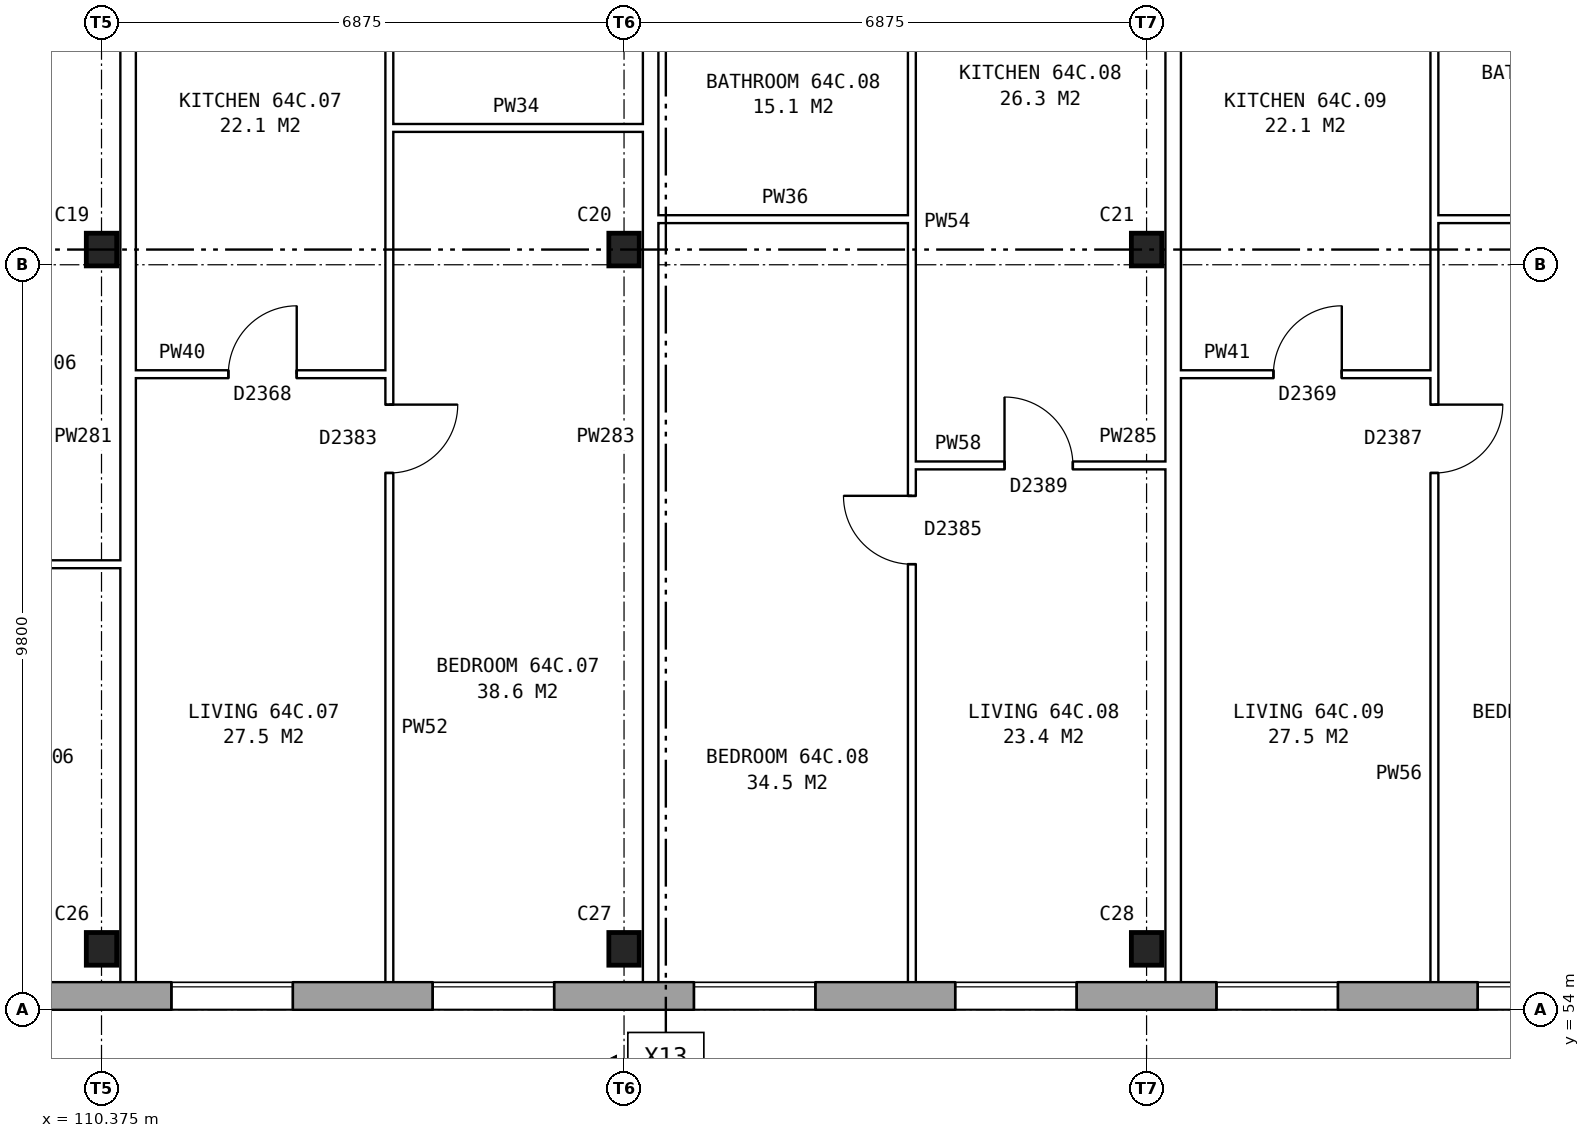
"""IFC4 building model, lengths in metres.
Left out: names, types, materials, properties, quantities, classifications, styles, units other than length and angle.
Written with IfcOpenShell. Run it as: python <this file> out.ifc"""

import sys

from ifc_helpers import new_model, si_unit, direction, frame, frame_2d, origin, origin_2d, place, context, subcontext, project, spatial, rectangle, i_section, extrude, element, fill, save


model = new_model("IFC4")
c1 = context("Model", 3, precision=1e-05, world=origin(), true_north=direction((0.0, 1.0)))
c2 = subcontext(c1, "Body", "Model", "MODEL_VIEW")
j1 = project(units=[si_unit("LENGTHUNIT", "METRE"), si_unit("PLANEANGLEUNIT", "RADIAN")], contexts=[c1])
p1 = place(None, origin())
s1 = spatial("IfcSite", under=j1, at=p1, CompositionType="ELEMENT")
p2 = place(p1, origin())
s2 = spatial("IfcBuilding", under=s1, at=p2, CompositionType="ELEMENT")
p3 = place(p2, frame((0.0, 0.0, 227.6)))
s3 = spatial("IfcBuildingStorey", under=s2, at=p3, CompositionType="ELEMENT", Elevation=227.6)
for number, where, z_axis, x_axis in (
    (1, (110.375, 54.8, 0.0), (0.0, 0.0, 1.0), (1.0, 0.0, 0.0)),
    (2, (117.25, 54.8, 0.0), (0.0, 0.0, 1.0), (1.0, 0.0, 0.0)),
    (3, (124.125, 54.8, 0.0), (0.0, 0.0, 1.0), (1.0, 0.0, 0.0)),
    (4, (110.375, 64.0, 0.0), (0.0, 0.0, 1.0), (1.0, 0.0, 0.0)),
    (5, (117.25, 64.0, 0.0), (0.0, 0.0, 1.0), (1.0, 0.0, 0.0)),
    (6, (124.125, 64.0, 0.0), (0.0, 0.0, 1.0), (1.0, 0.0, 0.0)),
):
    element("IfcColumn", number, at=place(p3, frame(where, z_axis=z_axis, x_axis=x_axis)), inside=s3, PredefinedType="COLUMN", context=c2, shape_type="SweptSolid", body=[
        extrude(i_section(OverallWidth=0.4, OverallDepth=0.43, WebThickness=0.04, FlangeThickness=0.04, at=origin_2d()), origin(), (0.0, 0.0, 1.0), 2.85),
    ])
p4 = place(p3, frame((75.95, 54.18, 0.0), z_axis=(0.0, 0.0, 1.0), x_axis=(1.0, 0.0, 0.0)))
e7 = element("IfcWall", 7, at=p4, inside=s3, PredefinedType="STANDARD", context=c2, shape_type="SweptSolid", body=[
    extrude(rectangle(XDim=55.1, YDim=0.36, at=frame_2d((27.55, 0.0))), origin(), (0.0, 0.0, 1.0), 2.85),
])
p5 = place(p4, frame((0.969, 0.0, 0.8)))
e8 = element("IfcOpeningElement", 8, at=p5, cuts=e7, PredefinedType="OPENING", context=c2, shape_type="SweptSolid", body=[
    extrude(rectangle(XDim=1.6, YDim=1.8, at=frame_2d((0.8, 0.9))), frame((0.0, 0.19, 0.0), z_axis=(0.0, -1.0, 0.0), x_axis=(1.0, 0.0, 0.0)), (0.0, 0.0, 1.0), 0.38),
])
p6 = place(p4, frame((4.406, 0.0, 0.8)))
e9 = element("IfcOpeningElement", 9, at=p6, cuts=e7, PredefinedType="OPENING", context=c2, shape_type="SweptSolid", body=[
    extrude(rectangle(XDim=1.6, YDim=1.8, at=frame_2d((0.8, 0.9))), frame((0.0, 0.19, 0.0), z_axis=(0.0, -1.0, 0.0), x_axis=(1.0, 0.0, 0.0)), (0.0, 0.0, 1.0), 0.38),
])
p7 = place(p4, frame((7.844, 0.0, 0.8)))
e10 = element("IfcOpeningElement", 10, at=p7, cuts=e7, PredefinedType="OPENING", context=c2, shape_type="SweptSolid", body=[
    extrude(rectangle(XDim=1.6, YDim=1.8, at=frame_2d((0.8, 0.9))), frame((0.0, 0.19, 0.0), z_axis=(0.0, -1.0, 0.0), x_axis=(1.0, 0.0, 0.0)), (0.0, 0.0, 1.0), 0.38),
])
p8 = place(p4, frame((11.281, 0.0, 0.8)))
e11 = element("IfcOpeningElement", 11, at=p8, cuts=e7, PredefinedType="OPENING", context=c2, shape_type="SweptSolid", body=[
    extrude(rectangle(XDim=1.6, YDim=1.8, at=frame_2d((0.8, 0.9))), frame((0.0, 0.19, 0.0), z_axis=(0.0, -1.0, 0.0), x_axis=(1.0, 0.0, 0.0)), (0.0, 0.0, 1.0), 0.38),
])
p9 = place(p4, frame((14.719, 0.0, 0.8)))
e12 = element("IfcOpeningElement", 12, at=p9, cuts=e7, PredefinedType="OPENING", context=c2, shape_type="SweptSolid", body=[
    extrude(rectangle(XDim=1.6, YDim=1.8, at=frame_2d((0.8, 0.9))), frame((0.0, 0.19, 0.0), z_axis=(0.0, -1.0, 0.0), x_axis=(1.0, 0.0, 0.0)), (0.0, 0.0, 1.0), 0.38),
])
p10 = place(p4, frame((18.156, 0.0, 0.8)))
e13 = element("IfcOpeningElement", 13, at=p10, cuts=e7, PredefinedType="OPENING", context=c2, shape_type="SweptSolid", body=[
    extrude(rectangle(XDim=1.6, YDim=1.8, at=frame_2d((0.8, 0.9))), frame((0.0, 0.19, 0.0), z_axis=(0.0, -1.0, 0.0), x_axis=(1.0, 0.0, 0.0)), (0.0, 0.0, 1.0), 0.38),
])
p11 = place(p4, frame((21.594, 0.0, 0.8)))
e14 = element("IfcOpeningElement", 14, at=p11, cuts=e7, PredefinedType="OPENING", context=c2, shape_type="SweptSolid", body=[
    extrude(rectangle(XDim=1.6, YDim=1.8, at=frame_2d((0.8, 0.9))), frame((0.0, 0.19, 0.0), z_axis=(0.0, -1.0, 0.0), x_axis=(1.0, 0.0, 0.0)), (0.0, 0.0, 1.0), 0.38),
])
p12 = place(p4, frame((25.031, 0.0, 0.8)))
e15 = element("IfcOpeningElement", 15, at=p12, cuts=e7, PredefinedType="OPENING", context=c2, shape_type="SweptSolid", body=[
    extrude(rectangle(XDim=1.6, YDim=1.8, at=frame_2d((0.8, 0.9))), frame((0.0, 0.19, 0.0), z_axis=(0.0, -1.0, 0.0), x_axis=(1.0, 0.0, 0.0)), (0.0, 0.0, 1.0), 0.38),
])
p13 = place(p4, frame((28.469, 0.0, 0.8)))
e16 = element("IfcOpeningElement", 16, at=p13, cuts=e7, PredefinedType="OPENING", context=c2, shape_type="SweptSolid", body=[
    extrude(rectangle(XDim=1.6, YDim=1.8, at=frame_2d((0.8, 0.9))), frame((0.0, 0.19, 0.0), z_axis=(0.0, -1.0, 0.0), x_axis=(1.0, 0.0, 0.0)), (0.0, 0.0, 1.0), 0.38),
])
p14 = place(p4, frame((31.906, 0.0, 0.8)))
e17 = element("IfcOpeningElement", 17, at=p14, cuts=e7, PredefinedType="OPENING", context=c2, shape_type="SweptSolid", body=[
    extrude(rectangle(XDim=1.6, YDim=1.8, at=frame_2d((0.8, 0.9))), frame((0.0, 0.19, 0.0), z_axis=(0.0, -1.0, 0.0), x_axis=(1.0, 0.0, 0.0)), (0.0, 0.0, 1.0), 0.38),
])
p15 = place(p4, frame((35.344, 0.0, 0.8)))
e18 = element("IfcOpeningElement", 18, at=p15, cuts=e7, PredefinedType="OPENING", context=c2, shape_type="SweptSolid", body=[
    extrude(rectangle(XDim=1.6, YDim=1.8, at=frame_2d((0.8, 0.9))), frame((0.0, 0.19, 0.0), z_axis=(0.0, -1.0, 0.0), x_axis=(1.0, 0.0, 0.0)), (0.0, 0.0, 1.0), 0.38),
])
p16 = place(p4, frame((38.781, 0.0, 0.8)))
e19 = element("IfcOpeningElement", 19, at=p16, cuts=e7, PredefinedType="OPENING", context=c2, shape_type="SweptSolid", body=[
    extrude(rectangle(XDim=1.6, YDim=1.8, at=frame_2d((0.8, 0.9))), frame((0.0, 0.19, 0.0), z_axis=(0.0, -1.0, 0.0), x_axis=(1.0, 0.0, 0.0)), (0.0, 0.0, 1.0), 0.38),
])
p17 = place(p4, frame((42.219, 0.0, 0.8)))
e20 = element("IfcOpeningElement", 20, at=p17, cuts=e7, PredefinedType="OPENING", context=c2, shape_type="SweptSolid", body=[
    extrude(rectangle(XDim=1.6, YDim=1.8, at=frame_2d((0.8, 0.9))), frame((0.0, 0.19, 0.0), z_axis=(0.0, -1.0, 0.0), x_axis=(1.0, 0.0, 0.0)), (0.0, 0.0, 1.0), 0.38),
])
p18 = place(p4, frame((45.656, 0.0, 0.8)))
e21 = element("IfcOpeningElement", 21, at=p18, cuts=e7, PredefinedType="OPENING", context=c2, shape_type="SweptSolid", body=[
    extrude(rectangle(XDim=1.6, YDim=1.8, at=frame_2d((0.8, 0.9))), frame((0.0, 0.19, 0.0), z_axis=(0.0, -1.0, 0.0), x_axis=(1.0, 0.0, 0.0)), (0.0, 0.0, 1.0), 0.38),
])
p19 = place(p4, frame((49.094, 0.0, 0.8)))
e22 = element("IfcOpeningElement", 22, at=p19, cuts=e7, PredefinedType="OPENING", context=c2, shape_type="SweptSolid", body=[
    extrude(rectangle(XDim=1.6, YDim=1.8, at=frame_2d((0.8, 0.9))), frame((0.0, 0.19, 0.0), z_axis=(0.0, -1.0, 0.0), x_axis=(1.0, 0.0, 0.0)), (0.0, 0.0, 1.0), 0.38),
])
p20 = place(p4, frame((52.531, 0.0, 0.8)))
e23 = element("IfcOpeningElement", 23, at=p20, cuts=e7, PredefinedType="OPENING", context=c2, shape_type="SweptSolid", body=[
    extrude(rectangle(XDim=1.6, YDim=1.8, at=frame_2d((0.8, 0.9))), frame((0.0, 0.19, 0.0), z_axis=(0.0, -1.0, 0.0), x_axis=(1.0, 0.0, 0.0)), (0.0, 0.0, 1.0), 0.38),
])
p21 = place(p3, frame((107.287, 59.86, 0.0), z_axis=(0.0, 0.0, 1.0), x_axis=(1.0, 0.0, 0.0)))
e24 = element("IfcWall", 24, at=p21, inside=s3, PredefinedType="PARTITIONING", context=c2, shape_type="SweptSolid", body=[
    extrude(rectangle(XDim=3.338, YDim=0.1, at=frame_2d((1.669, 0.0))), origin(), (0.0, 0.0, 1.0), 2.85),
])
p22 = place(p21, frame((1.219, 0.0, 0.0)))
e25 = element("IfcOpeningElement", 25, at=p22, cuts=e24, PredefinedType="OPENING", context=c2, shape_type="SweptSolid", body=[
    extrude(rectangle(XDim=0.9, YDim=2.1, at=frame_2d((0.45, 1.05))), frame((0.0, 0.06, 0.0), z_axis=(0.0, -1.0, 0.0), x_axis=(1.0, 0.0, 0.0)), (0.0, 0.0, 1.0), 0.12),
])
p23 = place(p3, frame((121.037, 61.16, 0.0), z_axis=(0.0, 0.0, 1.0), x_axis=(1.0, 0.0, 0.0)))
e26 = element("IfcWall", 26, at=p23, inside=s3, PredefinedType="PARTITIONING", context=c2, shape_type="SweptSolid", body=[
    extrude(rectangle(XDim=3.338, YDim=0.1, at=frame_2d((1.669, 0.0))), origin(), (0.0, 0.0, 1.0), 2.85),
])
p24 = place(p23, frame((1.219, 0.0, 0.0)))
e27 = element("IfcOpeningElement", 27, at=p24, cuts=e26, PredefinedType="OPENING", context=c2, shape_type="SweptSolid", body=[
    extrude(rectangle(XDim=0.9, YDim=2.1, at=frame_2d((0.45, 1.05))), frame((0.0, 0.06, 0.0), z_axis=(0.0, -1.0, 0.0), x_axis=(1.0, 0.0, 0.0)), (0.0, 0.0, 1.0), 0.12),
])
p25 = place(p3, frame((110.825, 62.36, 0.0), z_axis=(0.0, 0.0, 1.0), x_axis=(1.0, 0.0, 0.0)))
e28 = element("IfcWall", 28, at=p25, inside=s3, PredefinedType="PARTITIONING", context=c2, shape_type="SweptSolid", body=[
    extrude(rectangle(XDim=3.337, YDim=0.1, at=frame_2d((1.668, 0.0))), origin(), (0.0, 0.0, 1.0), 2.85),
])
p26 = place(p25, frame((1.219, 0.0, 0.0)))
e29 = element("IfcOpeningElement", 29, at=p26, cuts=e28, PredefinedType="OPENING", context=c2, shape_type="SweptSolid", body=[
    extrude(rectangle(XDim=0.9, YDim=2.1, at=frame_2d((0.45, 1.05))), frame((0.0, 0.06, 0.0), z_axis=(0.0, -1.0, 0.0), x_axis=(1.0, 0.0, 0.0)), (0.0, 0.0, 1.0), 0.12),
])
p27 = place(p3, frame((124.575, 62.36, 0.0), z_axis=(0.0, 0.0, 1.0), x_axis=(1.0, 0.0, 0.0)))
e30 = element("IfcWall", 30, at=p27, inside=s3, PredefinedType="PARTITIONING", context=c2, shape_type="SweptSolid", body=[
    extrude(rectangle(XDim=3.337, YDim=0.1, at=frame_2d((1.668, 0.0))), origin(), (0.0, 0.0, 1.0), 2.85),
])
p28 = place(p27, frame((1.219, 0.0, 0.0)))
e31 = element("IfcOpeningElement", 31, at=p28, cuts=e30, PredefinedType="OPENING", context=c2, shape_type="SweptSolid", body=[
    extrude(rectangle(XDim=0.9, YDim=2.1, at=frame_2d((0.45, 1.05))), frame((0.0, 0.06, 0.0), z_axis=(0.0, -1.0, 0.0), x_axis=(1.0, 0.0, 0.0)), (0.0, 0.0, 1.0), 0.12),
])
p29 = place(p3, frame((117.7, 64.4, 0.0), z_axis=(0.0, 0.0, 1.0), x_axis=(1.0, 0.0, 0.0)))
e32 = element("IfcWall", 32, at=p29, inside=s3, PredefinedType="PARTITIONING", context=c2, shape_type="SweptSolid", body=[
    extrude(rectangle(XDim=3.337, YDim=0.1, at=frame_2d((1.668, 0.0))), origin(), (0.0, 0.0, 1.0), 2.85),
])
p30 = place(p3, frame((127.912, 64.4, 0.0), z_axis=(0.0, 0.0, 1.0), x_axis=(1.0, 0.0, 0.0)))
e33 = element("IfcWall", 33, at=p30, inside=s3, PredefinedType="PARTITIONING", context=c2, shape_type="SweptSolid", body=[
    extrude(rectangle(XDim=3.448, YDim=0.1, at=frame_2d((1.724, 0.0))), origin(), (0.0, 0.0, 1.0), 2.85),
])
p31 = place(p3, frame((114.162, 65.6, 0.0), z_axis=(0.0, 0.0, 1.0), x_axis=(1.0, 0.0, 0.0)))
e34 = element("IfcWall", 34, at=p31, inside=s3, PredefinedType="PARTITIONING", context=c2, shape_type="SweptSolid", body=[
    extrude(rectangle(XDim=3.338, YDim=0.1, at=frame_2d((1.669, 0.0))), origin(), (0.0, 0.0, 1.0), 2.85),
])
p32 = place(p3, frame((110.725, 54.36, 0.0), z_axis=(0.0, 0.0, 1.0), x_axis=(0.0, 1.0, 0.0)))
e35 = element("IfcWall", 35, at=p32, inside=s3, PredefinedType="PARTITIONING", context=c2, shape_type="SweptSolid", body=[
    extrude(rectangle(XDim=14.34, YDim=0.2, at=frame_2d((7.17, 0.0))), origin(), (0.0, 0.0, 1.0), 2.85),
])
p33 = place(p3, frame((114.162, 54.36, 0.0), z_axis=(0.0, 0.0, 1.0), x_axis=(0.0, 1.0, 0.0)))
e36 = element("IfcWall", 36, at=p33, inside=s3, PredefinedType="PARTITIONING", context=c2, shape_type="SweptSolid", body=[
    extrude(rectangle(XDim=14.34, YDim=0.1, at=frame_2d((7.17, 0.0))), origin(), (0.0, 0.0, 1.0), 2.85),
])
p34 = place(p33, frame((6.7, 0.0, 0.0)))
e37 = element("IfcOpeningElement", 37, at=p34, cuts=e36, PredefinedType="OPENING", context=c2, shape_type="SweptSolid", body=[
    extrude(rectangle(XDim=0.9, YDim=2.1, at=frame_2d((0.45, 1.05))), frame((0.0, 0.06, 0.0), z_axis=(0.0, -1.0, 0.0), x_axis=(1.0, 0.0, 0.0)), (0.0, 0.0, 1.0), 0.12),
])
p35 = place(p33, frame((13.04, 0.0, 0.0)))
e38 = element("IfcOpeningElement", 38, at=p35, cuts=e36, PredefinedType="OPENING", context=c2, shape_type="SweptSolid", body=[
    extrude(rectangle(XDim=0.9, YDim=2.1, at=frame_2d((0.45, 1.05))), frame((0.0, 0.06, 0.0), z_axis=(0.0, -1.0, 0.0), x_axis=(1.0, 0.0, 0.0)), (0.0, 0.0, 1.0), 0.12),
])
p36 = place(p3, frame((117.6, 54.36, 0.0), z_axis=(0.0, 0.0, 1.0), x_axis=(0.0, 1.0, 0.0)))
e39 = element("IfcWall", 39, at=p36, inside=s3, PredefinedType="PARTITIONING", context=c2, shape_type="SweptSolid", body=[
    extrude(rectangle(XDim=14.34, YDim=0.2, at=frame_2d((7.17, 0.0))), origin(), (0.0, 0.0, 1.0), 2.85),
])
p37 = place(p3, frame((121.037, 54.36, 0.0), z_axis=(0.0, 0.0, 1.0), x_axis=(0.0, 1.0, 0.0)))
e40 = element("IfcWall", 40, at=p37, inside=s3, PredefinedType="PARTITIONING", context=c2, shape_type="SweptSolid", body=[
    extrude(rectangle(XDim=14.34, YDim=0.1, at=frame_2d((7.17, 0.0))), origin(), (0.0, 0.0, 1.0), 2.85),
])
p38 = place(p37, frame((5.5, 0.0, 0.0)))
e41 = element("IfcOpeningElement", 41, at=p38, cuts=e40, PredefinedType="OPENING", context=c2, shape_type="SweptSolid", body=[
    extrude(rectangle(XDim=0.9, YDim=2.1, at=frame_2d((0.45, 1.05))), frame((0.0, 0.06, 0.0), z_axis=(0.0, -1.0, 0.0), x_axis=(1.0, 0.0, 0.0)), (0.0, 0.0, 1.0), 0.12),
])
p39 = place(p37, frame((13.04, 0.0, 0.0)))
e42 = element("IfcOpeningElement", 42, at=p39, cuts=e40, PredefinedType="OPENING", context=c2, shape_type="SweptSolid", body=[
    extrude(rectangle(XDim=0.9, YDim=2.1, at=frame_2d((0.45, 1.05))), frame((0.0, 0.06, 0.0), z_axis=(0.0, -1.0, 0.0), x_axis=(1.0, 0.0, 0.0)), (0.0, 0.0, 1.0), 0.12),
])
p40 = place(p3, frame((124.475, 54.36, 0.0), z_axis=(0.0, 0.0, 1.0), x_axis=(0.0, 1.0, 0.0)))
e43 = element("IfcWall", 43, at=p40, inside=s3, PredefinedType="PARTITIONING", context=c2, shape_type="SweptSolid", body=[
    extrude(rectangle(XDim=14.34, YDim=0.2, at=frame_2d((7.17, 0.0))), origin(), (0.0, 0.0, 1.0), 2.85),
])
p41 = place(p3, frame((127.912, 54.36, 0.0), z_axis=(0.0, 0.0, 1.0), x_axis=(0.0, 1.0, 0.0)))
e44 = element("IfcWall", 44, at=p41, inside=s3, PredefinedType="PARTITIONING", context=c2, shape_type="SweptSolid", body=[
    extrude(rectangle(XDim=14.34, YDim=0.1, at=frame_2d((7.17, 0.0))), origin(), (0.0, 0.0, 1.0), 2.85),
])
p42 = place(p41, frame((6.7, 0.0, 0.0)))
e45 = element("IfcOpeningElement", 45, at=p42, cuts=e44, PredefinedType="OPENING", context=c2, shape_type="SweptSolid", body=[
    extrude(rectangle(XDim=0.9, YDim=2.1, at=frame_2d((0.45, 1.05))), frame((0.0, 0.06, 0.0), z_axis=(0.0, -1.0, 0.0), x_axis=(1.0, 0.0, 0.0)), (0.0, 0.0, 1.0), 0.12),
])
p43 = place(p41, frame((13.04, 0.0, 0.0)))
e46 = element("IfcOpeningElement", 46, at=p43, cuts=e44, PredefinedType="OPENING", context=c2, shape_type="SweptSolid", body=[
    extrude(rectangle(XDim=0.9, YDim=2.1, at=frame_2d((0.45, 1.05))), frame((0.0, 0.06, 0.0), z_axis=(0.0, -1.0, 0.0), x_axis=(1.0, 0.0, 0.0)), (0.0, 0.0, 1.0), 0.12),
])
p44 = place(p15, origin())
e47 = element("IfcWindow", 47, at=p44, inside=s3, PartitioningType="SINGLE_PANEL", PredefinedType="WINDOW", context=c2, shape_type="SweptSolid", body=[
    extrude(rectangle(XDim=1.6, YDim=1.8, at=frame_2d((0.8, 0.9))), frame((0.0, 0.15, 0.0), z_axis=(0.0, -1.0, 0.0), x_axis=(1.0, 0.0, 0.0)), (0.0, 0.0, 1.0), 0.06),
])
fill(e18, e47)
p45 = place(p16, origin())
e48 = element("IfcWindow", 48, at=p45, inside=s3, PartitioningType="SINGLE_PANEL", PredefinedType="WINDOW", context=c2, shape_type="SweptSolid", body=[
    extrude(rectangle(XDim=1.6, YDim=1.8, at=frame_2d((0.8, 0.9))), frame((0.0, 0.15, 0.0), z_axis=(0.0, -1.0, 0.0), x_axis=(1.0, 0.0, 0.0)), (0.0, 0.0, 1.0), 0.06),
])
fill(e19, e48)
p46 = place(p17, origin())
e49 = element("IfcWindow", 49, at=p46, inside=s3, PartitioningType="SINGLE_PANEL", PredefinedType="WINDOW", context=c2, shape_type="SweptSolid", body=[
    extrude(rectangle(XDim=1.6, YDim=1.8, at=frame_2d((0.8, 0.9))), frame((0.0, 0.15, 0.0), z_axis=(0.0, -1.0, 0.0), x_axis=(1.0, 0.0, 0.0)), (0.0, 0.0, 1.0), 0.06),
])
fill(e20, e49)
p47 = place(p18, origin())
e50 = element("IfcWindow", 50, at=p47, inside=s3, PartitioningType="SINGLE_PANEL", PredefinedType="WINDOW", context=c2, shape_type="SweptSolid", body=[
    extrude(rectangle(XDim=1.6, YDim=1.8, at=frame_2d((0.8, 0.9))), frame((0.0, 0.15, 0.0), z_axis=(0.0, -1.0, 0.0), x_axis=(1.0, 0.0, 0.0)), (0.0, 0.0, 1.0), 0.06),
])
fill(e21, e50)
p48 = place(p19, origin())
e51 = element("IfcWindow", 51, at=p48, inside=s3, PartitioningType="SINGLE_PANEL", PredefinedType="WINDOW", context=c2, shape_type="SweptSolid", body=[
    extrude(rectangle(XDim=1.6, YDim=1.8, at=frame_2d((0.8, 0.9))), frame((0.0, 0.15, 0.0), z_axis=(0.0, -1.0, 0.0), x_axis=(1.0, 0.0, 0.0)), (0.0, 0.0, 1.0), 0.06),
])
fill(e22, e51)
p49 = place(p20, origin())
e52 = element("IfcWindow", 52, at=p49, inside=s3, PartitioningType="SINGLE_PANEL", PredefinedType="WINDOW", context=c2, shape_type="SweptSolid", body=[
    extrude(rectangle(XDim=1.6, YDim=1.8, at=frame_2d((0.8, 0.9))), frame((0.0, 0.15, 0.0), z_axis=(0.0, -1.0, 0.0), x_axis=(1.0, 0.0, 0.0)), (0.0, 0.0, 1.0), 0.06),
])
fill(e23, e52)
p50 = place(p34, frame((0.9, 0.0, 0.0), z_axis=(0.0, 0.0, 1.0), x_axis=(-1.0, 0.0, 0.0)))
e53 = element("IfcDoor", 53, at=p50, inside=s3, OperationType="SINGLE_SWING_LEFT", PredefinedType="DOOR", context=c2, shape_type="SweptSolid", body=[
    extrude(rectangle(XDim=0.9, YDim=2.1, at=frame_2d((0.45, 1.05))), frame((0.0, 0.025, 0.0), z_axis=(0.0, -1.0, 0.0), x_axis=(1.0, 0.0, 0.0)), (0.0, 0.0, 1.0), 0.05),
])
fill(e37, e53)
p51 = place(p26, origin())
e54 = element("IfcDoor", 54, at=p51, inside=s3, OperationType="SINGLE_SWING_RIGHT", PredefinedType="DOOR", context=c2, shape_type="SweptSolid", body=[
    extrude(rectangle(XDim=0.9, YDim=2.1, at=frame_2d((0.45, 1.05))), frame((0.0, 0.025, 0.0), z_axis=(0.0, -1.0, 0.0), x_axis=(1.0, 0.0, 0.0)), (0.0, 0.0, 1.0), 0.05),
])
fill(e29, e54)
p52 = place(p38, origin())
e55 = element("IfcDoor", 55, at=p52, inside=s3, OperationType="SINGLE_SWING_RIGHT", PredefinedType="DOOR", context=c2, shape_type="SweptSolid", body=[
    extrude(rectangle(XDim=0.9, YDim=2.1, at=frame_2d((0.45, 1.05))), frame((0.0, 0.025, 0.0), z_axis=(0.0, -1.0, 0.0), x_axis=(1.0, 0.0, 0.0)), (0.0, 0.0, 1.0), 0.05),
])
fill(e41, e55)
p53 = place(p24, origin())
e56 = element("IfcDoor", 56, at=p53, inside=s3, OperationType="SINGLE_SWING_LEFT", PredefinedType="DOOR", context=c2, shape_type="SweptSolid", body=[
    extrude(rectangle(XDim=0.9, YDim=2.1, at=frame_2d((0.45, 1.05))), frame((0.0, 0.025, 0.0), z_axis=(0.0, -1.0, 0.0), x_axis=(1.0, 0.0, 0.0)), (0.0, 0.0, 1.0), 0.05),
])
fill(e27, e56)
p54 = place(p42, frame((0.9, 0.0, 0.0), z_axis=(0.0, 0.0, 1.0), x_axis=(-1.0, 0.0, 0.0)))
e57 = element("IfcDoor", 57, at=p54, inside=s3, OperationType="SINGLE_SWING_LEFT", PredefinedType="DOOR", context=c2, shape_type="SweptSolid", body=[
    extrude(rectangle(XDim=0.9, YDim=2.1, at=frame_2d((0.45, 1.05))), frame((0.0, 0.025, 0.0), z_axis=(0.0, -1.0, 0.0), x_axis=(1.0, 0.0, 0.0)), (0.0, 0.0, 1.0), 0.05),
])
fill(e45, e57)
p55 = place(p28, origin())
e58 = element("IfcDoor", 58, at=p55, inside=s3, OperationType="SINGLE_SWING_RIGHT", PredefinedType="DOOR", context=c2, shape_type="SweptSolid", body=[
    extrude(rectangle(XDim=0.9, YDim=2.1, at=frame_2d((0.45, 1.05))), frame((0.0, 0.025, 0.0), z_axis=(0.0, -1.0, 0.0), x_axis=(1.0, 0.0, 0.0)), (0.0, 0.0, 1.0), 0.05),
])
fill(e31, e58)
save(model, sys.argv[1])
